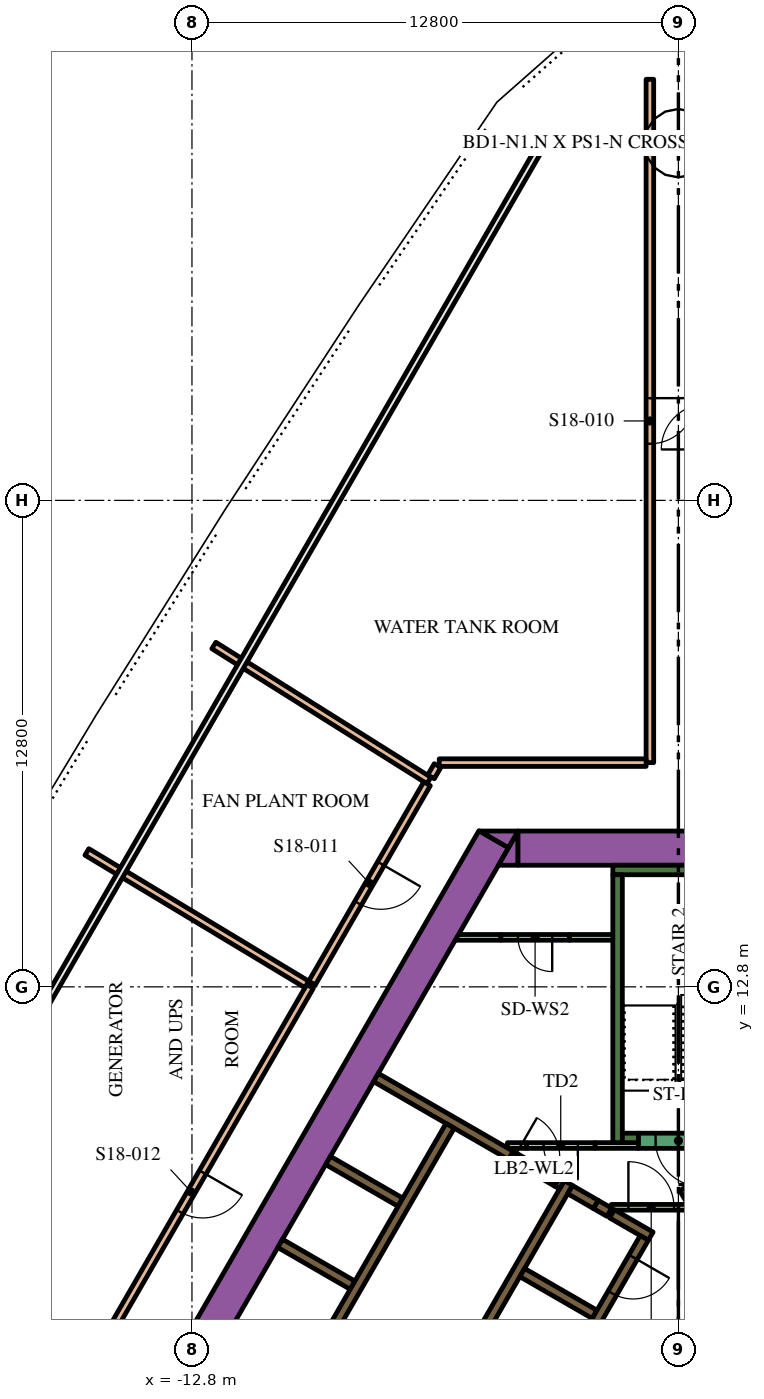
"""IFC4 building model, lengths in metres.
Left out: names, types, materials, properties, quantities, classifications, styles, units other than length and angle.
Written with IfcOpenShell. Run it as: python <this file> out.ifc"""

import sys

from ifc_helpers import new_model, si_unit, direction, frame, frame_2d, origin, place, context, subcontext, project, spatial, polyline, rectangle, outline, extrude, element, fill, save


model = new_model("IFC4")
c1 = context("Model", 3, precision=1e-05, world=origin(), true_north=direction((0.0, 1.0)))
c2 = subcontext(c1, "Body", "Model", "MODEL_VIEW")
j1 = project(units=[si_unit("LENGTHUNIT", "METRE"), si_unit("PLANEANGLEUNIT", "RADIAN")], contexts=[c1])
p1 = place(None, origin())
s1 = spatial("IfcSite", under=j1, at=p1, CompositionType="ELEMENT")
p2 = place(p1, origin())
s2 = spatial("IfcBuilding", under=s1, at=p2, CompositionType="ELEMENT")
p3 = place(p2, frame((0.0, 0.0, 78.3)))
s3 = spatial("IfcBuildingStorey", under=s2, at=p3, CompositionType="ELEMENT", Elevation=78.3)
p4 = place(p3, frame((-15.36, -1.503, 0.0), z_axis=(0.0, 0.0, 1.0), x_axis=(0.50000389221, 0.866023156604, 0.0)))
e1 = element("IfcWall", 1, at=p4, inside=s3, PredefinedType="SOLIDWALL", context=c2, shape_type="SweptSolid", body=[
    extrude(rectangle(XDim=21.0, YDim=0.9, at=frame_2d((10.5, 0.0))), origin(), (0.0, 0.0, 1.0), 5.4),
])
p5 = place(p3, origin())
e2 = element("IfcWall", 2, at=p5, inside=s3, PredefinedType="SOLIDWALL", context=c2, shape_type="SweptSolid", body=[
    extrude(outline(polyline([(-4.215, 16.9), (-4.469, 16.46), (-5.231, 16.9), (-4.215, 16.9)])), origin(), (0.0, 0.0, 1.0), 5.4),
])
p6 = place(p3, frame((-4.224, 16.45, 0.0), z_axis=(0.0, 0.0, 1.0), x_axis=(1.0, 0.0, 0.0)))
e3 = element("IfcWall", 3, at=p6, inside=s3, PredefinedType="SOLIDWALL", context=c2, shape_type="SweptSolid", body=[
    extrude(rectangle(XDim=9.488, YDim=0.9, at=frame_2d((4.744, 0.0))), origin(), (0.0, 0.0, 1.0), 5.4),
])
e4 = element("IfcWall", 4, at=p5, inside=s3, PredefinedType="SOLIDWALL", context=c2, shape_type="SweptSolid", body=[
    extrude(outline(polyline([(-4.734, 16.0), (-4.226, 16.88), (-4.226, 16.0), (-4.734, 16.0)])), origin(), (0.0, 0.0, 1.0), 5.4),
])
p7 = place(p3, frame((-1.725, 15.875, 0.0), z_axis=(0.0, 0.0, 1.0), x_axis=(1.0, 0.0, 0.0)))
e5 = element("IfcWall", 5, at=p7, inside=s3, PredefinedType="SOLIDWALL", context=c2, shape_type="SweptSolid", body=[
    extrude(rectangle(XDim=3.45, YDim=0.25, at=frame_2d((1.725, 0.0))), origin(), (0.0, 0.0, 1.0), 5.4),
])
p8 = place(p3, frame((-1.6, 8.7, 0.0), z_axis=(0.0, 0.0, 1.0), x_axis=(0.0, 1.0, 0.0)))
e6 = element("IfcWall", 6, at=p8, inside=s3, PredefinedType="SOLIDWALL", context=c2, shape_type="SweptSolid", body=[
    extrude(rectangle(XDim=7.05, YDim=0.25, at=frame_2d((3.525, 0.0))), origin(), (0.0, 0.0, 1.0), 5.4),
])
p9 = place(p3, frame((-1.475, 8.825, 0.0), z_axis=(0.0, 0.0, 1.0), x_axis=(1.0, 0.0, 0.0)))
e7 = element("IfcWall", 7, at=p9, inside=s3, PredefinedType="SOLIDWALL", context=c2, shape_type="SweptSolid", body=[
    extrude(rectangle(XDim=0.425, YDim=0.25, at=frame_2d((0.212, 0.0))), origin(), (0.0, 0.0, 1.0), 5.4),
])
e8 = element("IfcWall", 8, at=p5, inside=s3, PredefinedType="SOLIDWALL", context=c2, shape_type="SweptSolid", body=[
    extrude(outline(polyline([(0.335, 6.925), (0.335, 7.075), (0.335, 7.075), (0.335, 7.075), (0.245, 7.075), (0.079, 7.363), (0.035, 7.439), (0.252, 7.564), (0.377, 7.348), (6.552, -3.348), (6.677, -3.564), (6.46, -3.689), (4.897, -0.981), (0.332, 6.925), (0.335, 6.925), (0.335, 6.925), (0.335, 6.925)])), origin(), (0.0, 0.0, 1.0), 5.4),
])
p10 = place(p3, frame((-8.06, -1.311, 0.0), z_axis=(0.0, 0.0, 1.0), x_axis=(0.50000273126, 0.866023826885, 0.0)))
e9 = element("IfcWall", 9, at=p10, inside=s3, PredefinedType="SOLIDWALL", context=c2, shape_type="SweptSolid", body=[
    extrude(rectangle(XDim=10.33, YDim=0.25, at=frame_2d((5.165, 0.0))), origin(), (0.0, 0.0, 1.0), 5.4),
])
p11 = place(p3, frame((-1.819, 6.87, 0.0), z_axis=(0.0, 0.0, 1.0), x_axis=(-0.866294599386, 0.499533449405, 0.0)))
e10 = element("IfcWall", 10, at=p11, inside=s3, PredefinedType="SOLIDWALL", context=c2, shape_type="SweptSolid", body=[
    extrude(rectangle(XDim=0.41, YDim=0.25, at=frame_2d((0.205, 0.0))), origin(), (0.0, 0.0, 1.0), 5.4),
])
p12 = place(p3, frame((-2.849, 7.465, 0.0), z_axis=(0.0, 0.0, 1.0), x_axis=(0.865955664968, -0.500120771724, 0.0)))
e11 = element("IfcWall", 11, at=p12, inside=s3, PredefinedType="SOLIDWALL", context=c2, shape_type="SweptSolid", body=[
    extrude(rectangle(XDim=0.778, YDim=0.25, at=frame_2d((0.389, 0.0))), origin(), (0.0, 0.0, 1.0), 5.4),
])
p13 = place(p3, frame((-0.728, 6.24, 0.0), z_axis=(0.0, 0.0, 1.0), x_axis=(-0.866002680491, 0.500039355833, 0.0)))
e12 = element("IfcWall", 12, at=p13, inside=s3, PredefinedType="SOLIDWALL", context=c2, shape_type="SweptSolid", body=[
    extrude(rectangle(XDim=1.178, YDim=0.25, at=frame_2d((0.589, 0.0))), origin(), (0.0, 0.0, 1.0), 5.4),
])
p14 = place(p3, frame((-2.204, 4.182, 0.0), z_axis=(0.0, 0.0, 1.0), x_axis=(-0.866008176907, 0.50002983664, 0.0)))
e13 = element("IfcWall", 13, at=p14, inside=s3, PredefinedType="SOLIDWALL", context=c2, shape_type="SweptSolid", body=[
    extrude(rectangle(XDim=2.2, YDim=0.25, at=frame_2d((1.1, 0.0))), origin(), (0.0, 0.0, 1.0), 5.4),
])
e14 = element("IfcWall", 14, at=p5, inside=s3, PredefinedType="SOLIDWALL", context=c2, shape_type="SweptSolid", body=[
    extrude(outline(polyline([(-3.128, 7.481), (-3.259, 7.557), (-3.134, 7.773), (-3.003, 7.698), (-3.128, 7.481)])), origin(), (0.0, 0.0, 1.0), 5.4),
])
for number, where, z_axis, x_axis in (
    (15, (-8.574, 4.95, 0.0), (0.0, 0.0, 1.0), (-0.866, 0.5, 0.0)),
    (16, (-7.314, 7.132, 0.0), (0.0, 0.0, 1.0), (-0.866, 0.5, 0.0)),
):
    element("IfcWall", number, at=place(p3, frame(where, z_axis=z_axis, x_axis=x_axis)), inside=s3, PredefinedType="SOLIDWALL", context=c2, shape_type="SweptSolid", body=[
        extrude(rectangle(XDim=2.2, YDim=0.25, at=frame_2d((1.1, 0.0))), origin(), (0.0, 0.0, 1.0), 5.4),
    ])
p15 = place(p3, frame((-7.959, 10.415, 0.0), z_axis=(0.0, 0.0, 1.0), x_axis=(0.866020958405, -0.500007699544, 0.0)))
e17 = element("IfcWall", 17, at=p15, inside=s3, PredefinedType="SOLIDWALL", context=c2, shape_type="SweptSolid", body=[
    extrude(rectangle(XDim=4.1, YDim=0.25, at=frame_2d((2.05, 0.0))), origin(), (0.0, 0.0, 1.0), 5.4),
])
p16 = place(p3, frame((-3.997, 8.625, 0.0), z_axis=(0.0, 0.0, 1.0), x_axis=(-1.0, 0.0, 0.0)))
e18 = element("IfcWall", 18, at=p16, inside=s3, PredefinedType="PARTITIONING", context=c2, shape_type="SweptSolid", body=[
    extrude(rectangle(XDim=0.502, YDim=0.15, at=frame_2d((0.251, 0.0))), origin(), (0.0, 0.0, 1.0), 4.25),
])
p17 = place(p3, frame((-5.851, 14.102, 0.0), z_axis=(0.0, 0.0, 1.0), x_axis=(1.0, 0.0, 0.0)))
e19 = element("IfcWall", 19, at=p17, inside=s3, PredefinedType="PARTITIONING", context=c2, shape_type="SweptSolid", body=[
    extrude(rectangle(XDim=1.18, YDim=0.15, at=frame_2d((0.59, 0.0))), origin(), (0.0, 0.0, 1.0), 4.25),
])
p18 = place(p3, frame((-2.871, 14.102, 0.0), z_axis=(0.0, 0.0, 1.0), x_axis=(1.0, 0.0, 0.0)))
e20 = element("IfcWall", 20, at=p18, inside=s3, PredefinedType="PARTITIONING", context=c2, shape_type="SweptSolid", body=[
    extrude(rectangle(XDim=1.196, YDim=0.15, at=frame_2d((0.598, 0.0))), origin(), (0.0, 0.0, 1.0), 4.25),
])
p19 = place(p3, frame((-2.196, 8.625, 0.0), z_axis=(0.0, 0.0, 1.0), x_axis=(1.0, 0.0, 0.0)))
e21 = element("IfcWall", 21, at=p19, inside=s3, PredefinedType="PARTITIONING", context=c2, shape_type="SweptSolid", body=[
    extrude(rectangle(XDim=1.146, YDim=0.15, at=frame_2d((0.573, 0.0))), origin(), (0.0, 0.0, 1.0), 4.25),
])
p20 = place(p3, frame((-6.008, 9.144, 0.0), z_axis=(0.0, 0.0, 1.0), x_axis=(-0.500006956611, -0.866021387346, 0.0)))
e22 = element("IfcWall", 22, at=p20, inside=s3, PredefinedType="SOLIDWALL", context=c2, shape_type="SweptSolid", body=[
    extrude(rectangle(XDim=9.83, YDim=0.25, at=frame_2d((4.915, 0.0))), origin(), (0.0, 0.0, 1.0), 5.4),
])
p21 = place(p20, frame((6.985, 0.0, 0.0)))
e23 = element("IfcOpeningElement", 23, at=p21, cuts=e22, PredefinedType="OPENING", context=c2, shape_type="SweptSolid", body=[
    extrude(rectangle(XDim=0.9, YDim=2.1, at=frame_2d((0.45, 1.05))), frame((0.0, 0.135, 0.0), z_axis=(0.0, -1.0, 0.0), x_axis=(1.0, 0.0, 0.0)), (0.0, 0.0, 1.0), 0.27),
])
p22 = place(p3, frame((-0.898, 6.194, 0.0), z_axis=(0.0, 0.0, 1.0), x_axis=(-0.499996202215, -0.866027596426, 0.0)))
e24 = element("IfcWall", 24, at=p22, inside=s3, PredefinedType="SOLIDWALL", context=c2, shape_type="SweptSolid", body=[
    extrude(rectangle(XDim=9.83, YDim=0.25, at=frame_2d((4.915, 0.0))), origin(), (0.0, 0.0, 1.0), 5.4),
])
p23 = place(p22, frame((0.585, 0.0, 0.0)))
e25 = element("IfcOpeningElement", 25, at=p23, cuts=e24, PredefinedType="OPENING", context=c2, shape_type="SweptSolid", body=[
    extrude(rectangle(XDim=1.1, YDim=2.1, at=frame_2d((0.55, 1.05))), frame((0.0, 0.135, 0.0), z_axis=(0.0, -1.0, 0.0), x_axis=(1.0, 0.0, 0.0)), (0.0, 0.0, 1.0), 0.27),
])
p24 = place(p22, frame((3.105, 0.0, 0.0)))
e26 = element("IfcOpeningElement", 26, at=p24, cuts=e24, PredefinedType="OPENING", context=c2, shape_type="SweptSolid", body=[
    extrude(rectangle(XDim=1.1, YDim=2.1, at=frame_2d((0.55, 1.05))), frame((0.0, 0.135, 0.0), z_axis=(0.0, -1.0, 0.0), x_axis=(1.0, 0.0, 0.0)), (0.0, 0.0, 1.0), 0.27),
])
p25 = place(p22, frame((5.625, 0.0, 0.0)))
e27 = element("IfcOpeningElement", 27, at=p25, cuts=e24, PredefinedType="OPENING", context=c2, shape_type="SweptSolid", body=[
    extrude(rectangle(XDim=1.1, YDim=2.1, at=frame_2d((0.55, 1.05))), frame((0.0, 0.135, 0.0), z_axis=(0.0, -1.0, 0.0), x_axis=(1.0, 0.0, 0.0)), (0.0, 0.0, 1.0), 0.27),
])
p26 = place(p22, frame((8.145, 0.0, 0.0)))
e28 = element("IfcOpeningElement", 28, at=p26, cuts=e24, PredefinedType="OPENING", context=c2, shape_type="SweptSolid", body=[
    extrude(rectangle(XDim=1.1, YDim=2.1, at=frame_2d((0.55, 1.05))), frame((0.0, 0.135, 0.0), z_axis=(0.0, -1.0, 0.0), x_axis=(1.0, 0.0, 0.0)), (0.0, 0.0, 1.0), 0.27),
])
p27 = place(p3, frame((1.05, 8.75, 0.0), z_axis=(0.0, 0.0, 1.0), x_axis=(-1.0, 0.0, 0.0)))
e29 = element("IfcWall", 29, at=p27, inside=s3, PredefinedType="SOLIDWALL", context=c2, shape_type="SweptSolid", body=[
    extrude(rectangle(XDim=2.1, YDim=0.4, at=frame_2d((1.05, 0.0))), origin(), (0.0, 0.0, 1.0), 5.4),
])
p28 = place(p27, frame((0.45, 0.0, 0.0)))
e30 = element("IfcOpeningElement", 30, at=p28, cuts=e29, PredefinedType="OPENING", context=c2, shape_type="SweptSolid", body=[
    extrude(rectangle(XDim=1.2, YDim=2.1, at=frame_2d((0.6, 1.05))), frame((0.0, 0.21, 0.0), z_axis=(0.0, -1.0, 0.0), x_axis=(1.0, 0.0, 0.0)), (0.0, 0.0, 1.0), 0.42),
])
p29 = place(p3, frame((-2.196, 8.625, 0.0), z_axis=(0.0, 0.0, 1.0), x_axis=(-1.0, 0.0, 0.0)))
e31 = element("IfcWall", 31, at=p29, inside=s3, PredefinedType="PARTITIONING", context=c2, shape_type="SweptSolid", body=[
    extrude(rectangle(XDim=1.8, YDim=0.15, at=frame_2d((0.9, 0.0))), origin(), (0.0, 0.0, 1.0), 4.25),
])
p30 = place(p29, frame((0.45, 0.0, 0.0)))
e32 = element("IfcOpeningElement", 32, at=p30, cuts=e31, PredefinedType="OPENING", context=c2, shape_type="SweptSolid", body=[
    extrude(rectangle(XDim=0.9, YDim=2.1, at=frame_2d((0.45, 1.05))), frame((0.0, 0.085, 0.0), z_axis=(0.0, -1.0, 0.0), x_axis=(1.0, 0.0, 0.0)), (0.0, 0.0, 1.0), 0.17),
])
p31 = place(p3, frame((-1.765, 7.0, 0.0), z_axis=(0.0, 0.0, 1.0), x_axis=(1.0, 0.0, 0.0)))
e33 = element("IfcWall", 33, at=p31, inside=s3, PredefinedType="PARTITIONING", context=c2, shape_type="SweptSolid", body=[
    extrude(rectangle(XDim=2.1, YDim=0.15, at=frame_2d((1.05, 0.0))), origin(), (0.0, 0.0, 1.0), 4.25),
])
p32 = place(p31, frame((0.45, 0.0, 0.0)))
e34 = element("IfcOpeningElement", 34, at=p32, cuts=e33, PredefinedType="OPENING", context=c2, shape_type="SweptSolid", body=[
    extrude(rectangle(XDim=1.2, YDim=2.1, at=frame_2d((0.6, 1.05))), frame((0.0, 0.085, 0.0), z_axis=(0.0, -1.0, 0.0), x_axis=(1.0, 0.0, 0.0)), (0.0, 0.0, 1.0), 0.17),
])
p33 = place(p3, frame((-4.409, 8.365, 0.0), z_axis=(0.0, 0.0, 1.0), x_axis=(0.866034573852, -0.49998411664, 0.0)))
e35 = element("IfcWall", 35, at=p33, inside=s3, PredefinedType="SOLIDWALL", context=c2, shape_type="SweptSolid", body=[
    extrude(rectangle(XDim=1.4, YDim=0.25, at=frame_2d((0.7, 0.0))), origin(), (0.0, 0.0, 1.0), 5.4),
])
p34 = place(p33, frame((0.1, 0.0, 0.0)))
e36 = element("IfcOpeningElement", 36, at=p34, cuts=e35, PredefinedType="OPENING", context=c2, shape_type="SweptSolid", body=[
    extrude(rectangle(XDim=1.2, YDim=2.1, at=frame_2d((0.6, 1.05))), frame((0.0, 0.135, 0.0), z_axis=(0.0, -1.0, 0.0), x_axis=(1.0, 0.0, 0.0)), (0.0, 0.0, 1.0), 0.27),
])
p35 = place(p3, frame((-2.871, 14.102, 0.0), z_axis=(0.0, 0.0, 1.0), x_axis=(-1.0, 0.0, 0.0)))
e37 = element("IfcWall", 37, at=p35, inside=s3, PredefinedType="PARTITIONING", context=c2, shape_type="SweptSolid", body=[
    extrude(rectangle(XDim=1.8, YDim=0.15, at=frame_2d((0.9, 0.0))), origin(), (0.0, 0.0, 1.0), 4.25),
])
p36 = place(p35, frame((0.45, 0.0, 0.0)))
e38 = element("IfcOpeningElement", 38, at=p36, cuts=e37, PredefinedType="OPENING", context=c2, shape_type="SweptSolid", body=[
    extrude(rectangle(XDim=0.9, YDim=2.1, at=frame_2d((0.45, 1.05))), frame((0.0, 0.085, 0.0), z_axis=(0.0, -1.0, 0.0), x_axis=(1.0, 0.0, 0.0)), (0.0, 0.0, 1.0), 0.17),
])
p37 = place(p3, frame((-0.75, 36.68, 0.0), z_axis=(0.0, 0.0, 1.0), x_axis=(0.0, -1.0, 0.0)))
e39 = element("IfcWall", 39, at=p37, inside=s3, PredefinedType="PARTITIONING", context=c2, shape_type="SweptSolid", body=[
    extrude(rectangle(XDim=17.98, YDim=0.2, at=frame_2d((8.99, 0.0))), origin(), (0.0, 0.0, 1.0), 4.25),
])
p38 = place(p37, frame((8.39, 0.0, 0.0)))
e40 = element("IfcOpeningElement", 40, at=p38, cuts=e39, PredefinedType="OPENING", context=c2, shape_type="SweptSolid", body=[
    extrude(rectangle(XDim=1.2, YDim=2.1, at=frame_2d((0.6, 1.05))), frame((0.0, 0.11, 0.0), z_axis=(0.0, -1.0, 0.0), x_axis=(1.0, 0.0, 0.0)), (0.0, 0.0, 1.0), 0.22),
])
p39 = place(p3, frame((-9.692, 12.813, 0.0), z_axis=(0.0, 0.0, 1.0), x_axis=(-0.499991245628, -0.866030458065, 0.0)))
e41 = element("IfcWall", 41, at=p39, inside=s3, PredefinedType="PARTITIONING", context=c2, shape_type="SweptSolid", body=[
    extrude(rectangle(XDim=12.501, YDim=0.2, at=frame_2d((6.25, 0.0))), origin(), (0.0, 0.0, 1.0), 4.25),
])
p40 = place(p39, frame((5.651, 0.0, 0.0)))
e42 = element("IfcOpeningElement", 42, at=p40, cuts=e41, PredefinedType="OPENING", context=c2, shape_type="SweptSolid", body=[
    extrude(rectangle(XDim=1.2, YDim=2.1, at=frame_2d((0.6, 1.05))), frame((0.0, 0.11, 0.0), z_axis=(0.0, -1.0, 0.0), x_axis=(1.0, 0.0, 0.0)), (0.0, 0.0, 1.0), 0.22),
])
p41 = place(p3, frame((-9.778, 12.865, 0.0), z_axis=(0.0, 0.0, 1.0), x_axis=(-0.856637163458, 0.515919344648, 0.0)))
e43 = element("IfcWall", 43, at=p41, inside=s3, PredefinedType="PARTITIONING", context=c2, shape_type="SweptSolid", body=[
    extrude(rectangle(XDim=6.756, YDim=0.2, at=frame_2d((3.378, 0.0))), origin(), (0.0, 0.0, 1.0), 4.25),
])
p42 = place(p3, frame((-21.942, 5.304, 0.0), z_axis=(0.0, 0.0, 1.0), x_axis=(0.875134013618, -0.483880623924, 0.0)))
e44 = element("IfcWall", 44, at=p42, inside=s3, PredefinedType="PARTITIONING", context=c2, shape_type="SweptSolid", body=[
    extrude(rectangle(XDim=6.755, YDim=0.2, at=frame_2d((3.378, 0.0))), origin(), (0.0, 0.0, 1.0), 4.25),
])
p43 = place(p3, frame((-6.565, 18.23, 0.0), z_axis=(0.0, 0.0, 1.0), x_axis=(-0.846937435942, 0.531692561166, 0.0)))
e45 = element("IfcWall", 45, at=p43, inside=s3, PredefinedType="PARTITIONING", context=c2, shape_type="SweptSolid", body=[
    extrude(rectangle(XDim=6.682, YDim=0.2, at=frame_2d((3.341, 0.0))), origin(), (0.0, 0.0, 1.0), 4.25),
])
p44 = place(p3, frame((-6.615, 18.143, 0.0), z_axis=(0.0, 0.0, 1.0), x_axis=(-0.500002829465, -0.866023770186, 0.0)))
e46 = element("IfcWall", 46, at=p44, inside=s3, PredefinedType="PARTITIONING", context=c2, shape_type="SweptSolid", body=[
    extrude(rectangle(XDim=6.055, YDim=0.2, at=frame_2d((3.028, 0.0))), origin(), (0.0, 0.0, 1.0), 4.25),
])
p45 = place(p44, frame((2.427, 0.0, 0.0)))
e47 = element("IfcOpeningElement", 47, at=p45, cuts=e46, PredefinedType="OPENING", context=c2, shape_type="SweptSolid", body=[
    extrude(rectangle(XDim=1.2, YDim=2.1, at=frame_2d((0.6, 1.05))), frame((0.0, 0.11, 0.0), z_axis=(0.0, -1.0, 0.0), x_axis=(1.0, 0.0, 0.0)), (0.0, 0.0, 1.0), 0.22),
])
p46 = place(p3, frame((-6.293, 18.7, 0.0), z_axis=(0.0, 0.0, 1.0), x_axis=(1.0, 0.0, 0.0)))
e48 = element("IfcWall", 48, at=p46, inside=s3, PredefinedType="PARTITIONING", context=c2, shape_type="SweptSolid", body=[
    extrude(rectangle(XDim=5.443, YDim=0.2, at=frame_2d((2.722, 0.0))), origin(), (0.0, 0.0, 1.0), 4.25),
])
p47 = place(p3, frame((-6.51, 18.325, 0.0), z_axis=(0.0, 0.0, 1.0), x_axis=(0.500194616298, 0.865913012852, 0.0)))
e49 = element("IfcWall", 49, at=p47, inside=s3, PredefinedType="PARTITIONING", context=c2, shape_type="SweptSolid", body=[
    extrude(rectangle(XDim=0.343, YDim=0.2, at=frame_2d((0.171, 0.0))), origin(), (0.0, 0.0, 1.0), 4.25),
])
p48 = place(p23, origin())
e50 = element("IfcDoor", 50, at=p48, inside=s3, OperationType="DOUBLE_DOOR_SLIDING", PredefinedType="DOOR", context=c2, shape_type="SweptSolid", body=[
    extrude(rectangle(XDim=1.1, YDim=2.1, at=frame_2d((0.55, 1.05))), frame((0.0, 0.025, 0.0), z_axis=(0.0, -1.0, 0.0), x_axis=(1.0, 0.0, 0.0)), (0.0, 0.0, 1.0), 0.05),
])
fill(e25, e50)
p49 = place(p28, origin())
e51 = element("IfcDoor", 51, at=p49, inside=s3, OperationType="SINGLE_SWING_LEFT", PredefinedType="DOOR", context=c2, shape_type="SweptSolid", body=[
    extrude(rectangle(XDim=1.2, YDim=2.1, at=frame_2d((0.6, 1.05))), frame((0.0, 0.025, 0.0), z_axis=(0.0, -1.0, 0.0), x_axis=(1.0, 0.0, 0.0)), (0.0, 0.0, 1.0), 0.05),
])
fill(e30, e51)
p50 = place(p30, origin())
e52 = element("IfcDoor", 52, at=p50, inside=s3, OperationType="SINGLE_SWING_LEFT", PredefinedType="DOOR", context=c2, shape_type="SweptSolid", body=[
    extrude(rectangle(XDim=0.9, YDim=2.1, at=frame_2d((0.45, 1.05))), frame((0.0, 0.025, 0.0), z_axis=(0.0, -1.0, 0.0), x_axis=(1.0, 0.0, 0.0)), (0.0, 0.0, 1.0), 0.05),
])
fill(e32, e52)
p51 = place(p32, origin())
e53 = element("IfcDoor", 53, at=p51, inside=s3, OperationType="SINGLE_SWING_LEFT", PredefinedType="DOOR", context=c2, shape_type="SweptSolid", body=[
    extrude(rectangle(XDim=1.2, YDim=2.1, at=frame_2d((0.6, 1.05))), frame((0.0, 0.025, 0.0), z_axis=(0.0, -1.0, 0.0), x_axis=(1.0, 0.0, 0.0)), (0.0, 0.0, 1.0), 0.05),
])
fill(e34, e53)
p52 = place(p34, origin())
e54 = element("IfcDoor", 54, at=p52, inside=s3, OperationType="SINGLE_SWING_LEFT", PredefinedType="DOOR", context=c2, shape_type="SweptSolid", body=[
    extrude(rectangle(XDim=1.2, YDim=2.1, at=frame_2d((0.6, 1.05))), frame((0.0, 0.025, 0.0), z_axis=(0.0, -1.0, 0.0), x_axis=(1.0, 0.0, 0.0)), (0.0, 0.0, 1.0), 0.05),
])
fill(e36, e54)
p53 = place(p36, origin())
e55 = element("IfcDoor", 55, at=p53, inside=s3, OperationType="SINGLE_SWING_LEFT", PredefinedType="DOOR", context=c2, shape_type="SweptSolid", body=[
    extrude(rectangle(XDim=0.9, YDim=2.1, at=frame_2d((0.45, 1.05))), frame((0.0, 0.025, 0.0), z_axis=(0.0, -1.0, 0.0), x_axis=(1.0, 0.0, 0.0)), (0.0, 0.0, 1.0), 0.05),
])
fill(e38, e55)
p54 = place(p38, origin())
e56 = element("IfcDoor", 56, at=p54, inside=s3, OperationType="SINGLE_SWING_RIGHT", PredefinedType="DOOR", context=c2, shape_type="SweptSolid", body=[
    extrude(rectangle(XDim=1.2, YDim=2.1, at=frame_2d((0.6, 1.05))), frame((0.0, 0.025, 0.0), z_axis=(0.0, -1.0, 0.0), x_axis=(1.0, 0.0, 0.0)), (0.0, 0.0, 1.0), 0.05),
])
fill(e40, e56)
p55 = place(p45, origin())
e57 = element("IfcDoor", 57, at=p55, inside=s3, OperationType="SINGLE_SWING_RIGHT", PredefinedType="DOOR", context=c2, shape_type="SweptSolid", body=[
    extrude(rectangle(XDim=1.2, YDim=2.1, at=frame_2d((0.6, 1.05))), frame((0.0, 0.025, 0.0), z_axis=(0.0, -1.0, 0.0), x_axis=(1.0, 0.0, 0.0)), (0.0, 0.0, 1.0), 0.05),
])
fill(e47, e57)
p56 = place(p40, origin())
e58 = element("IfcDoor", 58, at=p56, inside=s3, OperationType="SINGLE_SWING_RIGHT", PredefinedType="DOOR", context=c2, shape_type="SweptSolid", body=[
    extrude(rectangle(XDim=1.2, YDim=2.1, at=frame_2d((0.6, 1.05))), frame((0.0, 0.025, 0.0), z_axis=(0.0, -1.0, 0.0), x_axis=(1.0, 0.0, 0.0)), (0.0, 0.0, 1.0), 0.05),
])
fill(e42, e58)
save(model, sys.argv[1])
